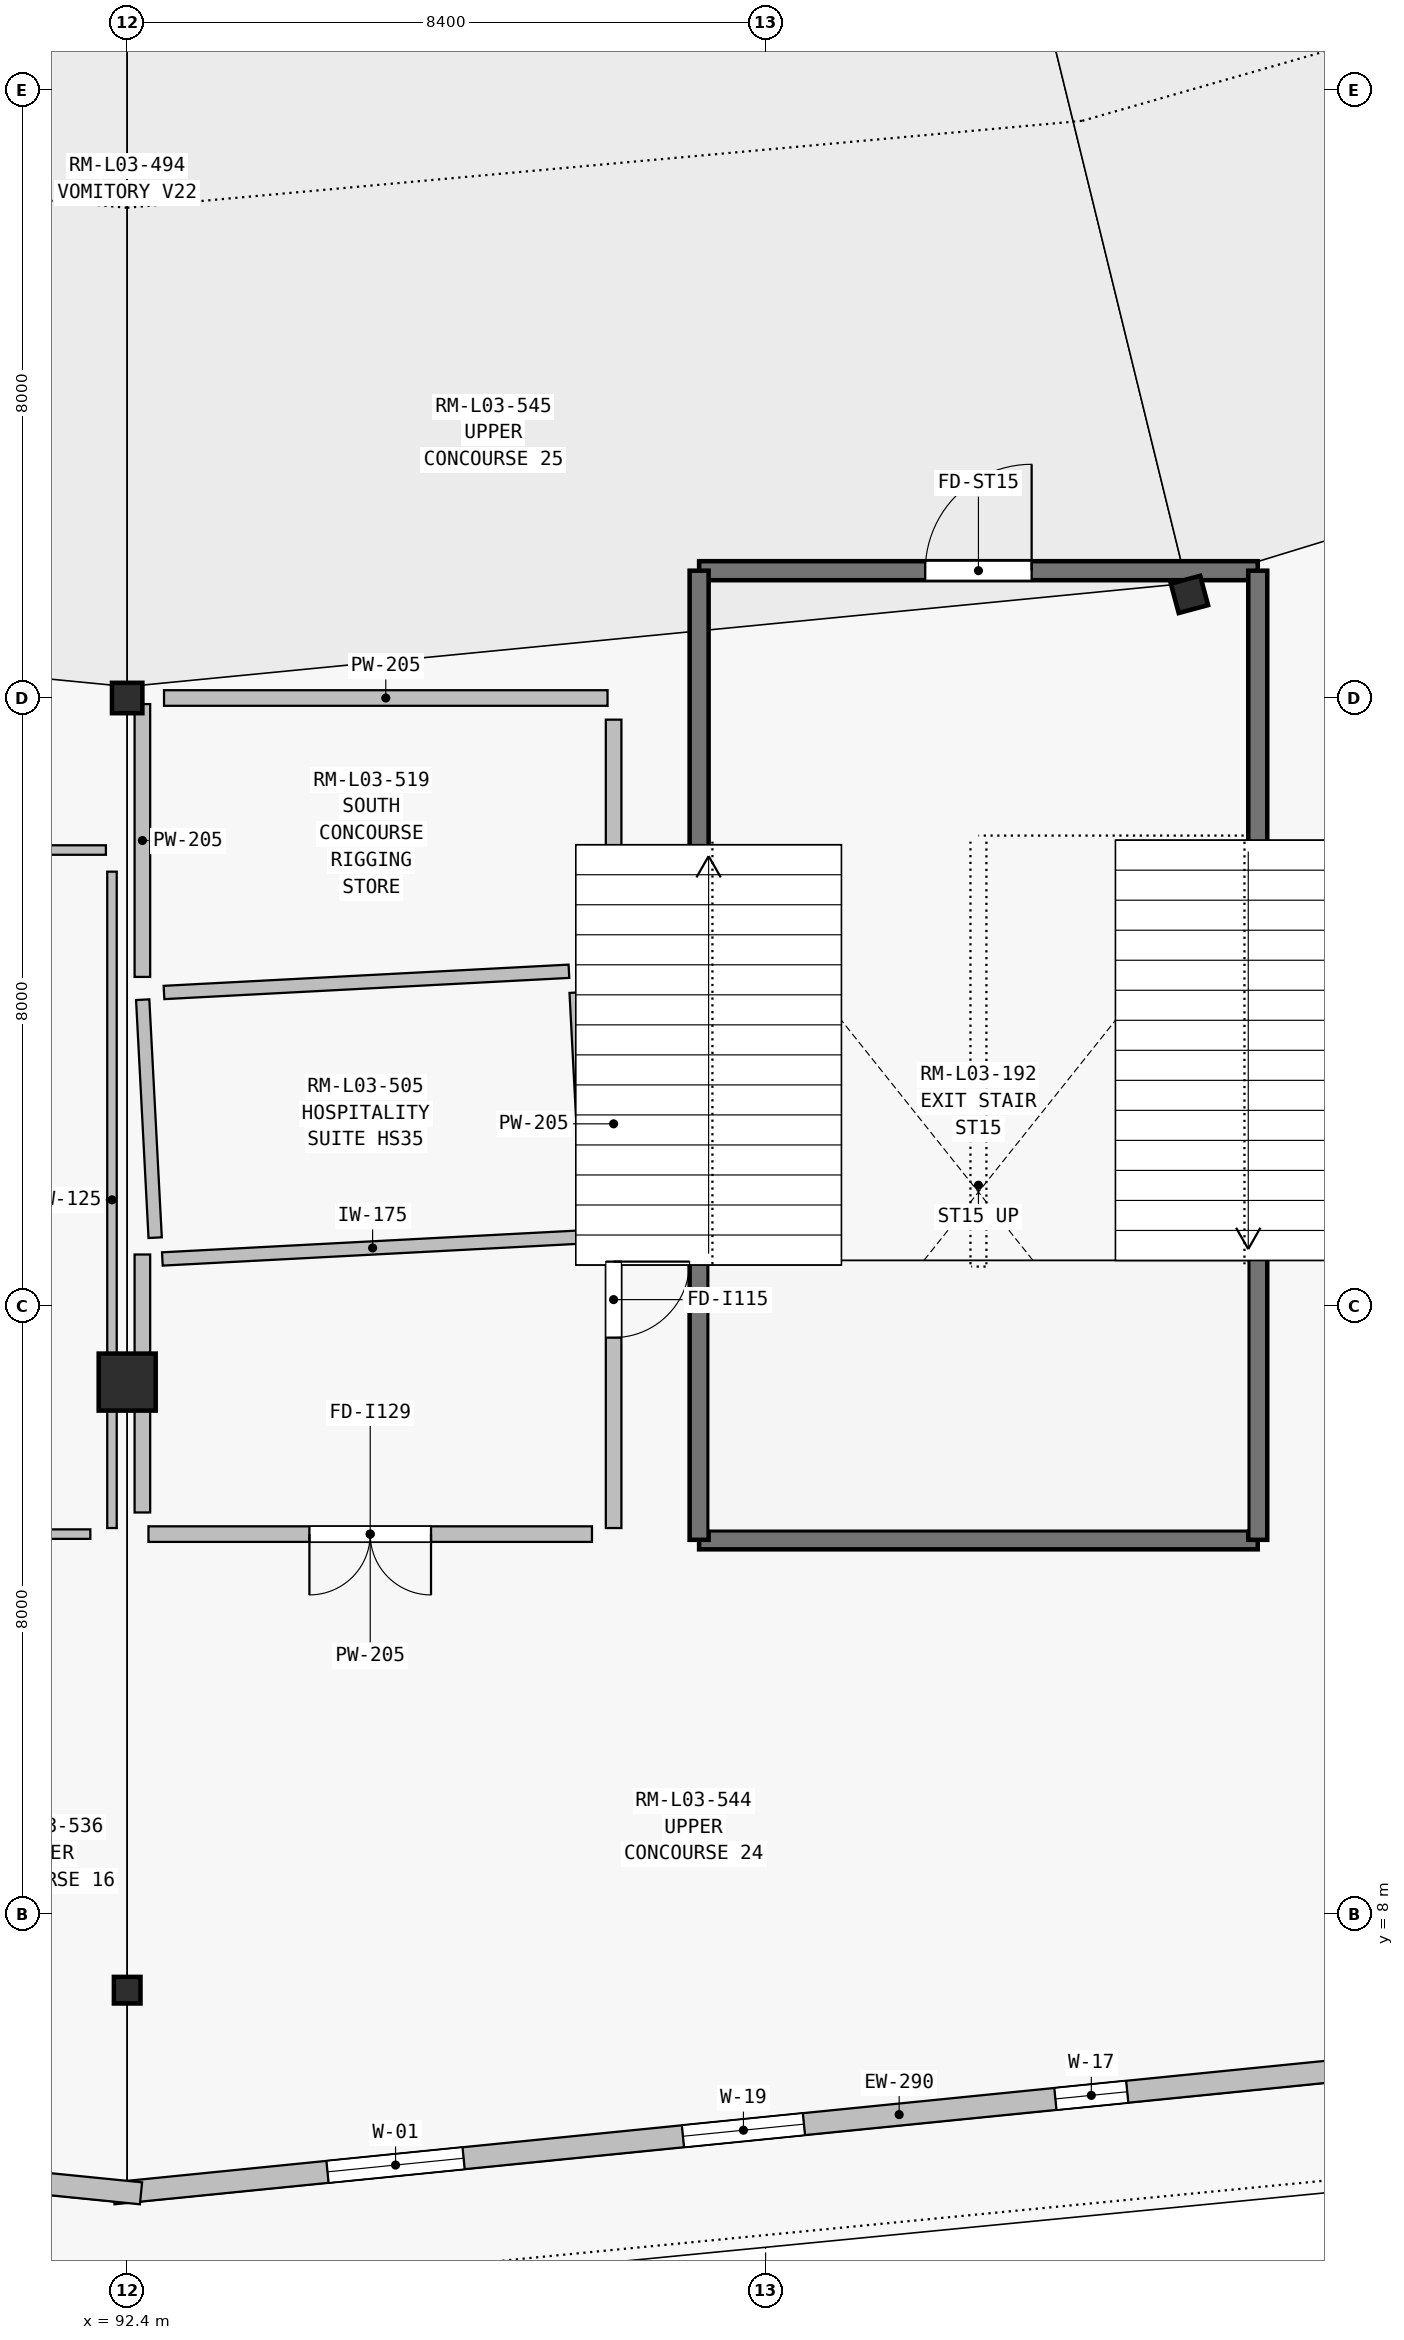
"""IFC4 building model, lengths in metres.
Left out: names, types, materials, properties, quantities, classifications, styles, units other than length and angle.
Written with IfcOpenShell. Run it as: python <this file> out.ifc"""

import sys

from ifc_helpers import new_model, si_unit, direction, frame, frame_2d, origin, origin_2d, place, context, subcontext, project, spatial, rectangle, i_section, extrude, element, fill, save


model = new_model("IFC4")
c1 = context("Model", 3, precision=1e-05, world=origin(), true_north=direction((0.0, 1.0)))
c2 = subcontext(c1, "Body", "Model", "MODEL_VIEW")
j1 = project(units=[si_unit("LENGTHUNIT", "METRE"), si_unit("PLANEANGLEUNIT", "RADIAN")], contexts=[c1])
p1 = place(None, origin())
s1 = spatial("IfcSite", under=j1, at=p1, CompositionType="ELEMENT")
p2 = place(p1, origin())
s2 = spatial("IfcBuilding", under=s1, at=p2, CompositionType="ELEMENT")
p3 = place(p2, frame((0.0, 0.0, 14.4)))
s3 = spatial("IfcBuildingStorey", under=s2, at=p3, CompositionType="ELEMENT", Elevation=14.4)
for number, where, z_axis, x_axis in (
    (1, (92.4, 24.0, 0.0), (0.0, 0.0, 1.0), (0.0, -1.0, 0.0)),
    (2, (106.376, 25.363, 0.0), (0.0, 0.0, 1.0), (0.259, -0.966, 0.0)),
):
    element("IfcColumn", number, at=place(p3, frame(where, z_axis=z_axis, x_axis=x_axis)), inside=s3, PredefinedType="COLUMN", context=c2, shape_type="SweptSolid", body=[
        extrude(i_section(OverallWidth=0.4, OverallDepth=0.4, WebThickness=0.016, FlangeThickness=0.028, at=origin_2d()), origin(), (0.0, 0.0, 1.0), 4.5),
    ])
p4 = place(p3, frame((92.4, 15.0, 0.0), z_axis=(0.0, 0.0, 1.0), x_axis=(0.0, -1.0, 0.0)))
e3 = element("IfcColumn", 3, at=p4, inside=s3, PredefinedType="COLUMN", context=c2, shape_type="SweptSolid", body=[
    extrude(rectangle(XDim=0.75, YDim=0.75, at=origin_2d()), origin(), (0.0, 0.0, 1.0), 4.5),
])
p5 = place(p3, frame((92.4, 7.0, 0.0), z_axis=(0.0, 0.0, 1.0), x_axis=(0.0, -1.0, 0.0)))
e4 = element("IfcColumn", 4, at=p5, inside=s3, PredefinedType="COLUMN", context=c2, shape_type="SweptSolid", body=[
    extrude(i_section(OverallWidth=0.35, OverallDepth=0.35, WebThickness=0.014, FlangeThickness=0.024, at=origin_2d()), origin(), (0.0, 0.0, 1.0), 4.5),
])
p6 = place(p3, frame((112.896, 6.399, 0.0), z_axis=(0.0, 0.0, 1.0), x_axis=(-0.995020426289, -0.099671215838, 0.0)))
e5 = element("IfcWall", 5, at=p6, inside=s3, PredefinedType="SOLIDWALL", context=c2, shape_type="SweptSolid", body=[
    extrude(rectangle(XDim=20.781, YDim=0.29, at=frame_2d((10.391, 0.0))), origin(), (0.0, 0.0, 1.0), 4.26),
])
p7 = place(p6, frame((2.025, 0.0, 0.9)))
e6 = element("IfcOpeningElement", 6, at=p7, cuts=e5, PredefinedType="OPENING", context=c2, shape_type="SweptSolid", body=[
    extrude(rectangle(XDim=2.45, YDim=1.35, at=frame_2d((1.225, 0.675))), frame((0.0, 0.155, 0.0), z_axis=(0.0, -1.0, 0.0), x_axis=(1.0, 0.0, 0.0)), (0.0, 0.0, 1.0), 0.31),
])
p8 = place(p6, frame((7.375, 0.0, 0.75)))
e7 = element("IfcOpeningElement", 7, at=p8, cuts=e5, PredefinedType="OPENING", context=c2, shape_type="SweptSolid", body=[
    extrude(rectangle(XDim=0.95, YDim=2.2, at=frame_2d((0.475, 1.1))), frame((0.0, 0.155, 0.0), z_axis=(0.0, -1.0, 0.0), x_axis=(1.0, 0.0, 0.0)), (0.0, 0.0, 1.0), 0.31),
])
p9 = place(p6, frame((11.65, 0.0, 0.9)))
e8 = element("IfcOpeningElement", 8, at=p9, cuts=e5, PredefinedType="OPENING", context=c2, shape_type="SweptSolid", body=[
    extrude(rectangle(XDim=1.6, YDim=1.45, at=frame_2d((0.8, 0.725))), frame((0.0, 0.155, 0.0), z_axis=(0.0, -1.0, 0.0), x_axis=(1.0, 0.0, 0.0)), (0.0, 0.0, 1.0), 0.31),
])
p10 = place(p6, frame((16.15, 0.0, 0.75)))
e9 = element("IfcOpeningElement", 9, at=p10, cuts=e5, PredefinedType="OPENING", context=c2, shape_type="SweptSolid", body=[
    extrude(rectangle(XDim=1.8, YDim=2.4, at=frame_2d((0.9, 1.2))), frame((0.0, 0.155, 0.0), z_axis=(0.0, -1.0, 0.0), x_axis=(1.0, 0.0, 0.0)), (0.0, 0.0, 1.0), 0.31),
])
p11 = place(p3, frame((92.582, 4.327, 0.0), z_axis=(0.0, 0.0, 1.0), x_axis=(-0.995020542998, 0.099670050731, 0.0)))
e10 = element("IfcWall", 10, at=p11, inside=s3, PredefinedType="SOLIDWALL", context=c2, shape_type="SweptSolid", body=[
    extrude(rectangle(XDim=20.781, YDim=0.29, at=frame_2d((10.391, 0.0))), origin(), (0.0, 0.0, 1.0), 4.26),
])
p12 = place(p11, frame((2.45, 0.0, 0.9)))
e11 = element("IfcOpeningElement", 11, at=p12, cuts=e10, PredefinedType="OPENING", context=c2, shape_type="SweptSolid", body=[
    extrude(rectangle(XDim=1.6, YDim=1.45, at=frame_2d((0.8, 0.725))), frame((0.0, 0.155, 0.0), z_axis=(0.0, -1.0, 0.0), x_axis=(1.0, 0.0, 0.0)), (0.0, 0.0, 1.0), 0.31),
])
p13 = place(p11, frame((6.95, 0.0, 0.75)))
e12 = element("IfcOpeningElement", 12, at=p13, cuts=e10, PredefinedType="OPENING", context=c2, shape_type="SweptSolid", body=[
    extrude(rectangle(XDim=1.8, YDim=2.4, at=frame_2d((0.9, 1.2))), frame((0.0, 0.155, 0.0), z_axis=(0.0, -1.0, 0.0), x_axis=(1.0, 0.0, 0.0)), (0.0, 0.0, 1.0), 0.31),
])
p14 = place(p11, frame((11.7, 0.0, 0.75)))
e13 = element("IfcOpeningElement", 13, at=p14, cuts=e10, PredefinedType="OPENING", context=c2, shape_type="SweptSolid", body=[
    extrude(rectangle(XDim=1.5, YDim=2.3, at=frame_2d((0.75, 1.15))), frame((0.0, 0.155, 0.0), z_axis=(0.0, -1.0, 0.0), x_axis=(1.0, 0.0, 0.0)), (0.0, 0.0, 1.0), 0.31),
])
p15 = place(p11, frame((16.45, 0.0, 0.75)))
e14 = element("IfcOpeningElement", 14, at=p15, cuts=e10, PredefinedType="OPENING", context=c2, shape_type="SweptSolid", body=[
    extrude(rectangle(XDim=1.2, YDim=2.2, at=frame_2d((0.6, 1.1))), frame((0.0, 0.155, 0.0), z_axis=(0.0, -1.0, 0.0), x_axis=(1.0, 0.0, 0.0)), (0.0, 0.0, 1.0), 0.31),
])
p16 = place(p3, frame((99.925, 12.925, 0.0), z_axis=(0.0, 0.0, 1.0), x_axis=(1.0, 0.0, 0.0)))
e15 = element("IfcWall", 15, at=p16, inside=s3, PredefinedType="SHEAR", context=c2, shape_type="SweptSolid", body=[
    extrude(rectangle(XDim=7.35, YDim=0.25, at=frame_2d((3.675, 0.0))), origin(), (0.0, 0.0, 1.0), 4.5),
])
p17 = place(p3, frame((99.925, 25.675, 0.0), z_axis=(0.0, 0.0, 1.0), x_axis=(1.0, 0.0, 0.0)))
e16 = element("IfcWall", 16, at=p17, inside=s3, PredefinedType="SHEAR", context=c2, shape_type="SweptSolid", body=[
    extrude(rectangle(XDim=7.35, YDim=0.25, at=frame_2d((3.675, 0.0))), origin(), (0.0, 0.0, 1.0), 4.5),
])
p18 = place(p17, frame((2.975, 0.0, 0.0)))
e17 = element("IfcOpeningElement", 17, at=p18, cuts=e16, PredefinedType="OPENING", context=c2, shape_type="SweptSolid", body=[
    extrude(rectangle(XDim=1.4, YDim=2.2, at=frame_2d((0.7, 1.1))), frame((0.0, 0.135, 0.0), z_axis=(0.0, -1.0, 0.0), x_axis=(1.0, 0.0, 0.0)), (0.0, 0.0, 1.0), 0.27),
])
for number, where, z_axis, x_axis in (
    (18, (99.925, 12.925, 0.0), (0.0, 0.0, 1.0), (0.0, 1.0, 0.0)),
    (19, (107.275, 12.925, 0.0), (0.0, 0.0, 1.0), (0.0, 1.0, 0.0)),
):
    element("IfcWall", number, at=place(p3, frame(where, z_axis=z_axis, x_axis=x_axis)), inside=s3, PredefinedType="SHEAR", context=c2, shape_type="SweptSolid", body=[
        extrude(rectangle(XDim=12.75, YDim=0.25, at=frame_2d((6.375, 0.0))), origin(), (0.0, 0.0, 1.0), 4.5),
    ])
p19 = place(p3, frame((98.395, 16.91, 0.0), z_axis=(0.0, 0.0, 1.0), x_axis=(-0.998628642553, -0.052352977686, 0.0)))
e20 = element("IfcWall", 20, at=p19, inside=s3, PredefinedType="PARTITIONING", context=c2, shape_type="SweptSolid", body=[
    extrude(rectangle(XDim=5.54, YDim=0.175, at=frame_2d((2.77, 0.0))), origin(), (0.0, 0.0, 1.0), 4.18),
])
p20 = place(p3, frame((92.768, 16.9, 0.0), z_axis=(0.0, 0.0, 1.0), x_axis=(-0.05232994845, 0.998629849592, 0.0)))
e21 = element("IfcWall", 21, at=p20, inside=s3, PredefinedType="PARTITIONING", context=c2, shape_type="SweptSolid", body=[
    extrude(rectangle(XDim=3.135, YDim=0.175, at=frame_2d((1.568, 0.0))), origin(), (0.0, 0.0, 1.0), 3.695),
])
p21 = place(p3, frame((92.884, 20.126, 0.0), z_axis=(0.0, 0.0, 1.0), x_axis=(0.998628805132, 0.052349876418, 0.0)))
e22 = element("IfcWall", 22, at=p21, inside=s3, PredefinedType="PARTITIONING", context=c2, shape_type="SweptSolid", body=[
    extrude(rectangle(XDim=5.335, YDim=0.175, at=frame_2d((2.667, 0.0))), origin(), (0.0, 0.0, 1.0), 4.18),
])
p22 = place(p3, frame((98.307, 20.125, 0.0), z_axis=(0.0, 0.0, 1.0), x_axis=(0.052322691835, -0.998630229824, 0.0)))
e23 = element("IfcWall", 23, at=p22, inside=s3, PredefinedType="PARTITIONING", context=c2, shape_type="SweptSolid", body=[
    extrude(rectangle(XDim=2.93, YDim=0.175, at=frame_2d((1.465, 0.0))), origin(), (0.0, 0.0, 1.0), 4.18),
])
p23 = place(p3, frame((86.08, 22.0, 0.0), z_axis=(0.0, 0.0, 1.0), x_axis=(1.0, 0.0, 0.0)))
e24 = element("IfcWall", 24, at=p23, inside=s3, PredefinedType="PARTITIONING", context=c2, shape_type="SweptSolid", body=[
    extrude(rectangle(XDim=6.04, YDim=0.125, at=frame_2d((3.02, 0.0))), origin(), (0.0, 0.0, 1.0), 4.2),
])
p24 = place(p3, frame((92.2, 21.715, 0.0), z_axis=(0.0, 0.0, 1.0), x_axis=(0.0, -1.0, 0.0)))
e25 = element("IfcWall", 25, at=p24, inside=s3, PredefinedType="PARTITIONING", context=c2, shape_type="SweptSolid", body=[
    extrude(rectangle(XDim=8.635, YDim=0.125, at=frame_2d((4.317, 0.0))), origin(), (0.0, 0.0, 1.0), 3.695),
])
p25 = place(p3, frame((91.915, 13.0, 0.0), z_axis=(0.0, 0.0, 1.0), x_axis=(-1.0, 0.0, 0.0)))
e26 = element("IfcWall", 26, at=p25, inside=s3, PredefinedType="PARTITIONING", context=c2, shape_type="SweptSolid", body=[
    extrude(rectangle(XDim=5.835, YDim=0.125, at=frame_2d((2.917, 0.0))), origin(), (0.0, 0.0, 1.0), 4.2),
])
p26 = place(p25, frame((2.443, 0.0, 0.0)))
e27 = element("IfcOpeningElement", 27, at=p26, cuts=e26, PredefinedType="OPENING", context=c2, shape_type="SweptSolid", body=[
    extrude(rectangle(XDim=0.95, YDim=2.1, at=frame_2d((0.475, 1.05))), frame((0.0, 0.073, 0.0), z_axis=(0.0, -1.0, 0.0), x_axis=(1.0, 0.0, 0.0)), (0.0, 0.0, 1.0), 0.145),
])
p27 = place(p3, frame((92.6, 20.331, 0.0), z_axis=(0.0, 0.0, 1.0), x_axis=(0.0, 1.0, 0.0)))
e28 = element("IfcWall", 28, at=p27, inside=s3, PredefinedType="SOLIDWALL", context=c2, shape_type="SweptSolid", body=[
    extrude(rectangle(XDim=3.589, YDim=0.205, at=frame_2d((1.794, 0.0))), origin(), (0.0, 0.0, 1.0), 2.943),
])
p28 = place(p3, frame((92.885, 24.0, 0.0), z_axis=(0.0, 0.0, 1.0), x_axis=(1.0, 0.0, 0.0)))
e29 = element("IfcWall", 29, at=p28, inside=s3, PredefinedType="SOLIDWALL", context=c2, shape_type="SweptSolid", body=[
    extrude(rectangle(XDim=5.835, YDim=0.205, at=frame_2d((2.917, 0.0))), origin(), (0.0, 0.0, 1.0), 2.943),
])
p29 = place(p3, frame((98.8, 23.715, 0.0), z_axis=(0.0, 0.0, 1.0), x_axis=(0.0, -1.0, 0.0)))
e30 = element("IfcWall", 30, at=p29, inside=s3, PredefinedType="SOLIDWALL", context=c2, shape_type="SweptSolid", body=[
    extrude(rectangle(XDim=10.635, YDim=0.205, at=frame_2d((5.317, 0.0))), origin(), (0.0, 0.0, 1.0), 4.18),
])
p30 = place(p29, frame((7.13, 0.0, 0.0)))
e31 = element("IfcOpeningElement", 31, at=p30, cuts=e30, PredefinedType="OPENING", context=c2, shape_type="SweptSolid", body=[
    extrude(rectangle(XDim=1.0, YDim=2.2, at=frame_2d((0.5, 1.1))), frame((0.0, 0.113, 0.0), z_axis=(0.0, -1.0, 0.0), x_axis=(1.0, 0.0, 0.0)), (0.0, 0.0, 1.0), 0.225),
])
p31 = place(p3, frame((98.515, 13.0, 0.0), z_axis=(0.0, 0.0, 1.0), x_axis=(-1.0, 0.0, 0.0)))
e32 = element("IfcWall", 32, at=p31, inside=s3, PredefinedType="SOLIDWALL", context=c2, shape_type="SweptSolid", body=[
    extrude(rectangle(XDim=5.835, YDim=0.205, at=frame_2d((2.917, 0.0))), origin(), (0.0, 0.0, 1.0), 4.18),
])
p32 = place(p31, frame((2.118, 0.0, 0.0)))
e33 = element("IfcOpeningElement", 33, at=p32, cuts=e32, PredefinedType="OPENING", context=c2, shape_type="SweptSolid", body=[
    extrude(rectangle(XDim=1.6, YDim=2.35, at=frame_2d((0.8, 1.175))), frame((0.0, 0.113, 0.0), z_axis=(0.0, -1.0, 0.0), x_axis=(1.0, 0.0, 0.0)), (0.0, 0.0, 1.0), 0.225),
])
p33 = place(p3, frame((92.6, 13.285, 0.0), z_axis=(0.0, 0.0, 1.0), x_axis=(0.0, 1.0, 0.0)))
e34 = element("IfcWall", 34, at=p33, inside=s3, PredefinedType="SOLIDWALL", context=c2, shape_type="SweptSolid", body=[
    extrude(rectangle(XDim=3.394, YDim=0.205, at=frame_2d((1.697, 0.0))), origin(), (0.0, 0.0, 1.0), 3.695),
])
p34 = place(p8, origin())
e35 = element("IfcWindow", 35, at=p34, inside=s3, PartitioningType="SINGLE_PANEL", PredefinedType="WINDOW", context=c2, shape_type="SweptSolid", body=[
    extrude(rectangle(XDim=0.95, YDim=2.2, at=frame_2d((0.475, 1.1))), frame((0.0, 0.03, 0.0), z_axis=(0.0, -1.0, 0.0), x_axis=(1.0, 0.0, 0.0)), (0.0, 0.0, 1.0), 0.06),
])
fill(e7, e35)
p35 = place(p9, origin())
e36 = element("IfcWindow", 36, at=p35, inside=s3, PartitioningType="SINGLE_PANEL", PredefinedType="WINDOW", context=c2, shape_type="SweptSolid", body=[
    extrude(rectangle(XDim=1.6, YDim=1.45, at=frame_2d((0.8, 0.725))), frame((0.0, 0.03, 0.0), z_axis=(0.0, -1.0, 0.0), x_axis=(1.0, 0.0, 0.0)), (0.0, 0.0, 1.0), 0.06),
])
fill(e8, e36)
p36 = place(p10, origin())
e37 = element("IfcWindow", 37, at=p36, inside=s3, PartitioningType="SINGLE_PANEL", PredefinedType="WINDOW", context=c2, shape_type="SweptSolid", body=[
    extrude(rectangle(XDim=1.8, YDim=2.4, at=frame_2d((0.9, 1.2))), frame((0.0, 0.03, 0.0), z_axis=(0.0, -1.0, 0.0), x_axis=(1.0, 0.0, 0.0)), (0.0, 0.0, 1.0), 0.06),
])
fill(e9, e37)
p37 = place(p18, origin())
e38 = element("IfcDoor", 38, at=p37, inside=s3, OperationType="SINGLE_SWING_RIGHT", PredefinedType="DOOR", context=c2, shape_type="SweptSolid", body=[
    extrude(rectangle(XDim=1.4, YDim=2.2, at=frame_2d((0.7, 1.1))), frame((0.0, 0.025, 0.0), z_axis=(0.0, -1.0, 0.0), x_axis=(1.0, 0.0, 0.0)), (0.0, 0.0, 1.0), 0.05),
])
fill(e17, e38)
p38 = place(p30, origin())
e39 = element("IfcDoor", 39, at=p38, inside=s3, OperationType="SINGLE_SWING_LEFT", PredefinedType="DOOR", context=c2, shape_type="SweptSolid", body=[
    extrude(rectangle(XDim=1.0, YDim=2.2, at=frame_2d((0.5, 1.1))), frame((0.0, 0.025, 0.0), z_axis=(0.0, -1.0, 0.0), x_axis=(1.0, 0.0, 0.0)), (0.0, 0.0, 1.0), 0.05),
])
fill(e31, e39)
p39 = place(p32, origin())
e40 = element("IfcDoor", 40, at=p39, inside=s3, OperationType="DOUBLE_DOOR_SINGLE_SWING", PredefinedType="DOOR", context=c2, shape_type="SweptSolid", body=[
    extrude(rectangle(XDim=1.6, YDim=2.35, at=frame_2d((0.8, 1.175))), frame((0.0, 0.025, 0.0), z_axis=(0.0, -1.0, 0.0), x_axis=(1.0, 0.0, 0.0)), (0.0, 0.0, 1.0), 0.05),
])
fill(e33, e40)
save(model, sys.argv[1])
